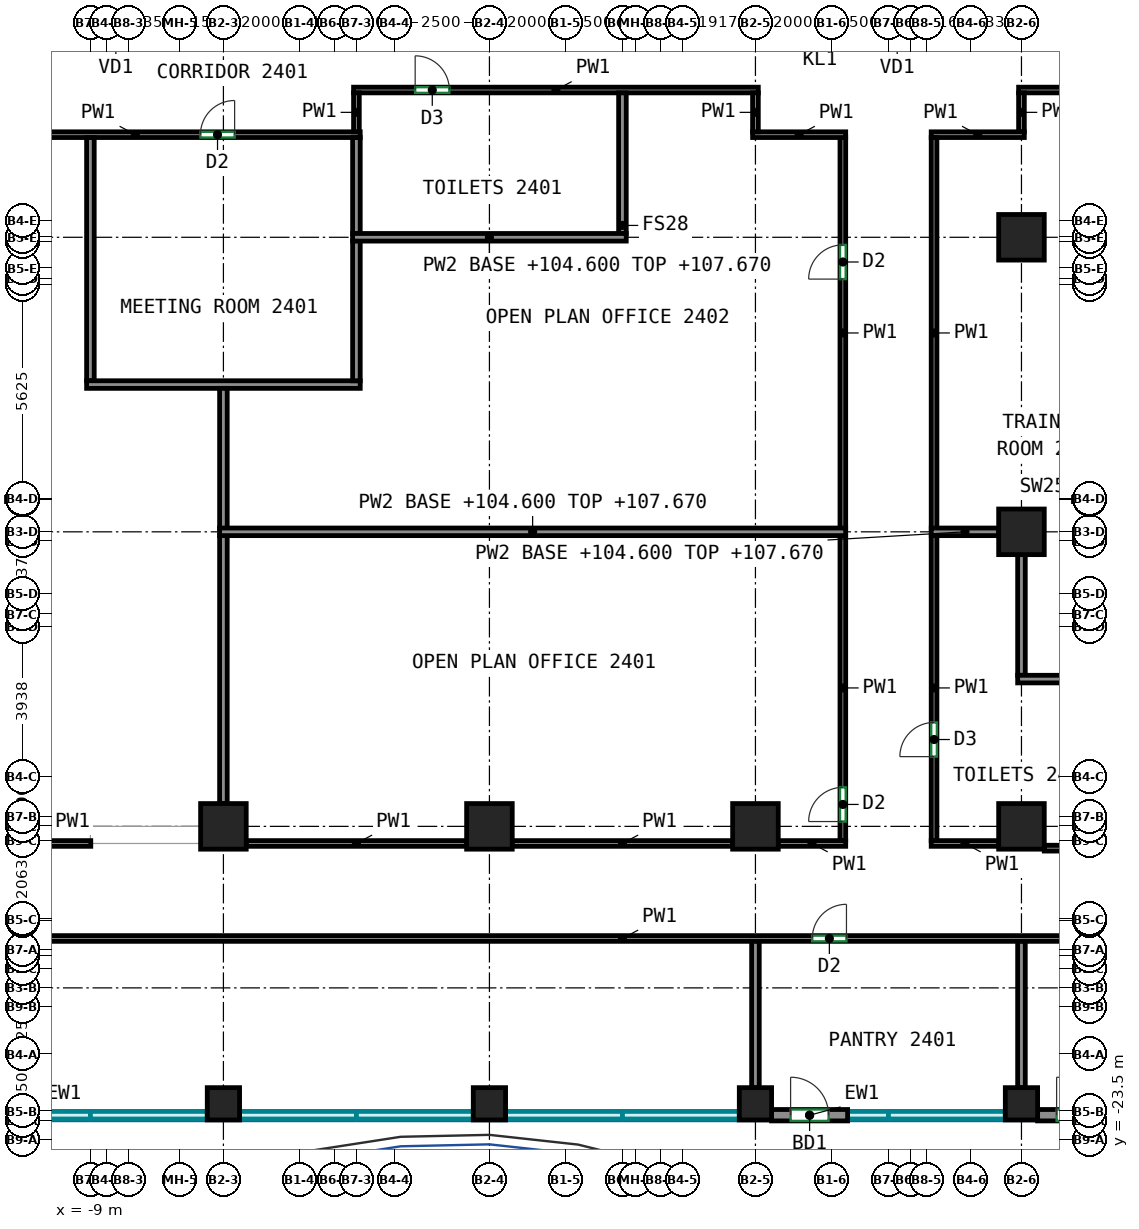
"""IFC4 building model, lengths in metres.
Left out: names, types, materials, properties, quantities, classifications, styles, units other than length and angle.
Written with IfcOpenShell. Run it as: python <this file> out.ifc"""

import sys

from ifc_helpers import new_model, si_unit, direction, frame, frame_2d, origin, origin_2d, place, context, subcontext, project, spatial, rectangle, extrude, source, transform, mapped, element, fill, save


model = new_model("IFC4")
c1 = context("Model", 3, precision=1e-05, world=origin(), true_north=direction((0.0, 1.0)))
c2 = subcontext(c1, "Body", "Model", "MODEL_VIEW")
j1 = project(units=[si_unit("LENGTHUNIT", "METRE"), si_unit("PLANEANGLEUNIT", "RADIAN")], contexts=[c1])
p1 = place(None, origin())
s1 = spatial("IfcSite", under=j1, at=p1, CompositionType="ELEMENT")
p2 = place(p1, origin())
s2 = spatial("IfcBuilding", under=s1, at=p2, CompositionType="ELEMENT")
p3 = place(p2, frame((0.0, 0.0, 104.6)))
s3 = spatial("IfcBuildingStorey", under=s2, at=p3, CompositionType="ELEMENT", Elevation=104.6)
m1 = source(origin(), c2, "Body", "SweptSolid", [
    extrude(rectangle(XDim=0.85, YDim=0.85, at=origin_2d()), origin(), (0.0, 0.0, 1.0), 3.72),
])
p4 = place(p3, frame((-5.5, -22.55, 0.0), z_axis=(0.0, 0.0, 1.0), x_axis=(1.0, 0.0, 0.0)))
e1 = element("IfcColumn", 1, at=p4, inside=s3, PredefinedType="COLUMN", context=c2, shape_type="MappedRepresentation", body=[
    mapped(m1, transform((0.0, 0.0, 0.0))),
])
m2 = source(origin(), c2, "Body", "SweptSolid", [
    extrude(rectangle(XDim=1.2, YDim=1.2, at=origin_2d()), origin(), (0.0, 0.0, 1.0), 3.72),
])
p5 = place(p3, frame((-5.5, -15.25, 0.0), z_axis=(0.0, 0.0, 1.0), x_axis=(1.0, 0.0, 0.0)))
e2 = element("IfcColumn", 2, at=p5, inside=s3, PredefinedType="COLUMN", context=c2, shape_type="MappedRepresentation", body=[
    mapped(m2, transform((0.0, 0.0, 0.0))),
])
p6 = place(p3, frame((1.5, -22.55, 0.0), z_axis=(0.0, 0.0, 1.0), x_axis=(1.0, 0.0, 0.0)))
e3 = element("IfcColumn", 3, at=p6, inside=s3, PredefinedType="COLUMN", context=c2, shape_type="MappedRepresentation", body=[
    mapped(m1, transform((0.0, 0.0, 0.0))),
])
p7 = place(p3, frame((1.5, -15.25, 0.0), z_axis=(0.0, 0.0, 1.0), x_axis=(1.0, 0.0, 0.0)))
e4 = element("IfcColumn", 4, at=p7, inside=s3, PredefinedType="COLUMN", context=c2, shape_type="MappedRepresentation", body=[
    mapped(m2, transform((0.0, 0.0, 0.0))),
])
p8 = place(p3, frame((8.5, -22.55, 0.0), z_axis=(0.0, 0.0, 1.0), x_axis=(1.0, 0.0, 0.0)))
e5 = element("IfcColumn", 5, at=p8, inside=s3, PredefinedType="COLUMN", context=c2, shape_type="MappedRepresentation", body=[
    mapped(m1, transform((0.0, 0.0, 0.0))),
])
p9 = place(p3, frame((8.5, -15.25, 0.0), z_axis=(0.0, 0.0, 1.0), x_axis=(1.0, 0.0, 0.0)))
e6 = element("IfcColumn", 6, at=p9, inside=s3, PredefinedType="COLUMN", context=c2, shape_type="MappedRepresentation", body=[
    mapped(m2, transform((0.0, 0.0, 0.0))),
])
p10 = place(p3, frame((15.5, -22.55, 0.0), z_axis=(0.0, 0.0, 1.0), x_axis=(1.0, 0.0, 0.0)))
e7 = element("IfcColumn", 7, at=p10, inside=s3, PredefinedType="COLUMN", context=c2, shape_type="MappedRepresentation", body=[
    mapped(m1, transform((0.0, 0.0, 0.0))),
])
for number, where, z_axis, x_axis in (
    (8, (15.5, -15.25, 0.0), (0.0, 0.0, 1.0), (1.0, 0.0, 0.0)),
    (9, (15.5, -7.5, 0.0), (0.0, 0.0, 1.0), (1.0, 0.0, 0.0)),
    (10, (15.5, 0.25, 0.0), (0.0, 0.0, 1.0), (1.0, 0.0, 0.0)),
):
    element("IfcColumn", number, at=place(p3, frame(where, z_axis=z_axis, x_axis=x_axis)), inside=s3, PredefinedType="COLUMN", context=c2, shape_type="MappedRepresentation", body=[
        mapped(m2, transform((0.0, 0.0, 0.0))),
    ])
m3 = source(origin(), c2, "Body", "SweptSolid", [
    extrude(rectangle(XDim=2.0, YDim=0.3, at=frame_2d((1.0, 0.0))), origin(), (0.0, 0.0, 1.0), 3.72),
])
p11 = place(p3, frame((8.925, -22.85, 0.0), z_axis=(0.0, 0.0, 1.0), x_axis=(1.0, 0.0, 0.0)))
e11 = element("IfcWall", 11, at=p11, inside=s3, PredefinedType="SOLIDWALL", context=c2, shape_type="MappedRepresentation", body=[
    mapped(m3, transform((0.0, 0.0, 0.0))),
])
p12 = place(p11, frame((0.5, 0.0, 0.0)))
e12 = element("IfcOpeningElement", 12, at=p12, cuts=e11, PredefinedType="OPENING", context=c2, shape_type="SweptSolid", body=[
    extrude(rectangle(XDim=1.0, YDim=2.1, at=frame_2d((0.5, 1.05))), frame((0.0, 0.16, 0.0), z_axis=(0.0, -1.0, 0.0), x_axis=(1.0, 0.0, 0.0)), (0.0, 0.0, 1.0), 0.32),
])
p13 = place(p3, frame((15.925, -22.85, 0.0), z_axis=(0.0, 0.0, 1.0), x_axis=(1.0, 0.0, 0.0)))
e13 = element("IfcWall", 13, at=p13, inside=s3, PredefinedType="SOLIDWALL", context=c2, shape_type="MappedRepresentation", body=[
    mapped(m3, transform((0.0, 0.0, 0.0))),
])
p14 = place(p13, frame((0.5, 0.0, 0.0)))
e14 = element("IfcOpeningElement", 14, at=p14, cuts=e13, PredefinedType="OPENING", context=c2, shape_type="SweptSolid", body=[
    extrude(rectangle(XDim=1.0, YDim=2.1, at=frame_2d((0.5, 1.05))), frame((0.0, 0.16, 0.0), z_axis=(0.0, -1.0, 0.0), x_axis=(1.0, 0.0, 0.0)), (0.0, 0.0, 1.0), 0.32),
])
p15 = place(p3, frame((-11.9, -15.7, 0.0), z_axis=(0.0, 0.0, 1.0), x_axis=(1.0, 0.0, 0.0)))
e15 = element("IfcWall", 15, at=p15, inside=s3, PredefinedType="PARTITIONING", context=c2, shape_type="SweptSolid", body=[
    extrude(rectangle(XDim=2.91, YDim=0.15, at=frame_2d((1.455, 0.0))), origin(), (0.0, 0.0, 1.0), 3.72),
])
p16 = place(p3, frame((-13.735, 2.95, 0.0), z_axis=(0.0, 0.0, 1.0), x_axis=(1.0, 0.0, 0.0)))
e16 = element("IfcWall", 16, at=p16, inside=s3, PredefinedType="PARTITIONING", context=c2, shape_type="SweptSolid", body=[
    extrude(rectangle(XDim=11.835, YDim=0.15, at=frame_2d((5.917, 0.0))), origin(), (0.0, 0.0, 1.0), 3.72),
])
p17 = place(p16, frame((7.63, 0.0, 0.0)))
e17 = element("IfcOpeningElement", 17, at=p17, cuts=e16, PredefinedType="OPENING", context=c2, shape_type="SweptSolid", body=[
    extrude(rectangle(XDim=0.9, YDim=2.1, at=frame_2d((0.45, 1.05))), frame((0.0, 0.085, 0.0), z_axis=(0.0, -1.0, 0.0), x_axis=(1.0, 0.0, 0.0)), (0.0, 0.0, 1.0), 0.17),
])
p18 = place(p3, frame((-19.325, -18.2, 0.0), z_axis=(0.0, 0.0, 1.0), x_axis=(1.0, 0.0, 0.0)))
e18 = element("IfcWall", 18, at=p18, inside=s3, PredefinedType="PARTITIONING", context=c2, shape_type="SweptSolid", body=[
    extrude(rectangle(XDim=48.65, YDim=0.15, at=frame_2d((24.325, 0.0))), origin(), (0.0, 0.0, 1.0), 3.72),
])
p19 = place(p18, frame((6.208, 0.0, 0.0)))
e19 = element("IfcOpeningElement", 19, at=p19, cuts=e18, PredefinedType="OPENING", context=c2, shape_type="SweptSolid", body=[
    extrude(rectangle(XDim=1.8, YDim=2.1, at=frame_2d((0.9, 1.05))), frame((0.0, 0.085, 0.0), z_axis=(0.0, -1.0, 0.0), x_axis=(1.0, 0.0, 0.0)), (0.0, 0.0, 1.0), 0.17),
])
p20 = place(p18, frame((29.32, 0.0, 0.0)))
e20 = element("IfcOpeningElement", 20, at=p20, cuts=e18, PredefinedType="OPENING", context=c2, shape_type="SweptSolid", body=[
    extrude(rectangle(XDim=0.9, YDim=2.1, at=frame_2d((0.45, 1.05))), frame((0.0, 0.085, 0.0), z_axis=(0.0, -1.0, 0.0), x_axis=(1.0, 0.0, 0.0)), (0.0, 0.0, 1.0), 0.17),
])
p21 = place(p18, frame((38.725, 0.0, 0.0)))
e21 = element("IfcOpeningElement", 21, at=p21, cuts=e18, PredefinedType="OPENING", context=c2, shape_type="SweptSolid", body=[
    extrude(rectangle(XDim=1.0, YDim=2.1, at=frame_2d((0.5, 1.05))), frame((0.0, 0.085, 0.0), z_axis=(0.0, -1.0, 0.0), x_axis=(1.0, 0.0, 0.0)), (0.0, 0.0, 1.0), 0.17),
])
p22 = place(p3, frame((-2.075, 4.125, 0.0), z_axis=(0.0, 0.0, 1.0), x_axis=(1.0, 0.0, 0.0)))
e22 = element("IfcWall", 22, at=p22, inside=s3, PredefinedType="PARTITIONING", context=c2, shape_type="SweptSolid", body=[
    extrude(rectangle(XDim=10.65, YDim=0.15, at=frame_2d((5.325, 0.0))), origin(), (0.0, 0.0, 1.0), 3.72),
])
p23 = place(p22, frame((1.621, 0.0, 0.0)))
e23 = element("IfcOpeningElement", 23, at=p23, cuts=e22, PredefinedType="OPENING", context=c2, shape_type="SweptSolid", body=[
    extrude(rectangle(XDim=0.9, YDim=2.1, at=frame_2d((0.45, 1.05))), frame((0.0, 0.085, 0.0), z_axis=(0.0, -1.0, 0.0), x_axis=(1.0, 0.0, 0.0)), (0.0, 0.0, 1.0), 0.17),
])
p24 = place(p3, frame((-2.0, 3.025, 0.0), z_axis=(0.0, 0.0, 1.0), x_axis=(0.0, 1.0, 0.0)))
e24 = element("IfcWall", 24, at=p24, inside=s3, PredefinedType="PARTITIONING", context=c2, shape_type="SweptSolid", body=[
    extrude(rectangle(XDim=1.025, YDim=0.15, at=frame_2d((0.513, 0.0))), origin(), (0.0, 0.0, 1.0), 3.72),
])
for number, where, z_axis, x_axis in (
    (25, (-4.9, -15.7, 0.0), (0.0, 0.0, 1.0), (1.0, 0.0, 0.0)),
    (26, (2.1, -15.7, 0.0), (0.0, 0.0, 1.0), (1.0, 0.0, 0.0)),
):
    element("IfcWall", number, at=place(p3, frame(where, z_axis=z_axis, x_axis=x_axis)), inside=s3, PredefinedType="PARTITIONING", context=c2, shape_type="SweptSolid", body=[
        extrude(rectangle(XDim=5.8, YDim=0.15, at=frame_2d((2.9, 0.0))), origin(), (0.0, 0.0, 1.0), 3.72),
    ])
p25 = place(p3, frame((9.1, -15.7, 0.0), z_axis=(0.0, 0.0, 1.0), x_axis=(1.0, 0.0, 0.0)))
e27 = element("IfcWall", 27, at=p25, inside=s3, PredefinedType="PARTITIONING", context=c2, shape_type="SweptSolid", body=[
    extrude(rectangle(XDim=1.775, YDim=0.15, at=frame_2d((0.887, 0.0))), origin(), (0.0, 0.0, 1.0), 3.72),
])
p26 = place(p3, frame((10.8, -15.625, 0.0), z_axis=(0.0, 0.0, 1.0), x_axis=(0.0, 1.0, 0.0)))
e28 = element("IfcWall", 28, at=p26, inside=s3, PredefinedType="PARTITIONING", context=c2, shape_type="SweptSolid", body=[
    extrude(rectangle(XDim=8.035, YDim=0.15, at=frame_2d((4.018, 0.0))), origin(), (0.0, 0.0, 1.0), 3.72),
])
p27 = place(p26, frame((0.502, 0.0, 0.0)))
e29 = element("IfcOpeningElement", 29, at=p27, cuts=e28, PredefinedType="OPENING", context=c2, shape_type="SweptSolid", body=[
    extrude(rectangle(XDim=0.9, YDim=2.1, at=frame_2d((0.45, 1.05))), frame((0.0, 0.085, 0.0), z_axis=(0.0, -1.0, 0.0), x_axis=(1.0, 0.0, 0.0)), (0.0, 0.0, 1.0), 0.17),
])
p28 = place(p3, frame((10.8, -7.41, 0.0), z_axis=(0.0, 0.0, 1.0), x_axis=(0.0, 1.0, 0.0)))
e30 = element("IfcWall", 30, at=p28, inside=s3, PredefinedType="PARTITIONING", context=c2, shape_type="SweptSolid", body=[
    extrude(rectangle(XDim=10.285, YDim=0.15, at=frame_2d((5.143, 0.0))), origin(), (0.0, 0.0, 1.0), 3.72),
])
p29 = place(p28, frame((6.56, 0.0, 0.0)))
e31 = element("IfcOpeningElement", 31, at=p29, cuts=e30, PredefinedType="OPENING", context=c2, shape_type="SweptSolid", body=[
    extrude(rectangle(XDim=0.9, YDim=2.1, at=frame_2d((0.45, 1.05))), frame((0.0, 0.085, 0.0), z_axis=(0.0, -1.0, 0.0), x_axis=(1.0, 0.0, 0.0)), (0.0, 0.0, 1.0), 0.17),
])
p30 = place(p3, frame((8.425, 2.95, 0.0), z_axis=(0.0, 0.0, 1.0), x_axis=(1.0, 0.0, 0.0)))
e32 = element("IfcWall", 32, at=p30, inside=s3, PredefinedType="PARTITIONING", context=c2, shape_type="SweptSolid", body=[
    extrude(rectangle(XDim=2.45, YDim=0.15, at=frame_2d((1.225, 0.0))), origin(), (0.0, 0.0, 1.0), 3.72),
])
p31 = place(p3, frame((8.5, 4.05, 0.0), z_axis=(0.0, 0.0, 1.0), x_axis=(0.0, -1.0, 0.0)))
e33 = element("IfcWall", 33, at=p31, inside=s3, PredefinedType="PARTITIONING", context=c2, shape_type="SweptSolid", body=[
    extrude(rectangle(XDim=1.025, YDim=0.15, at=frame_2d((0.513, 0.0))), origin(), (0.0, 0.0, 1.0), 3.72),
])
p32 = place(p3, frame((13.125, -15.7, 0.0), z_axis=(0.0, 0.0, 1.0), x_axis=(1.0, 0.0, 0.0)))
e34 = element("IfcWall", 34, at=p32, inside=s3, PredefinedType="PARTITIONING", context=c2, shape_type="SweptSolid", body=[
    extrude(rectangle(XDim=1.775, YDim=0.15, at=frame_2d((0.887, 0.0))), origin(), (0.0, 0.0, 1.0), 3.72),
])
p33 = place(p3, frame((16.1, -15.825, 0.0), z_axis=(0.0, 0.0, 1.0), x_axis=(1.0, 0.0, 0.0)))
e35 = element("IfcWall", 35, at=p33, inside=s3, PredefinedType="PARTITIONING", context=c2, shape_type="SweptSolid", body=[
    extrude(rectangle(XDim=13.225, YDim=0.15, at=frame_2d((6.612, 0.0))), origin(), (0.0, 0.0, 1.0), 3.72),
])
p34 = place(p3, frame((13.2, -15.625, 0.0), z_axis=(0.0, 0.0, 1.0), x_axis=(0.0, 1.0, 0.0)))
e36 = element("IfcWall", 36, at=p34, inside=s3, PredefinedType="PARTITIONING", context=c2, shape_type="SweptSolid", body=[
    extrude(rectangle(XDim=8.035, YDim=0.15, at=frame_2d((4.018, 0.0))), origin(), (0.0, 0.0, 1.0), 3.72),
])
p35 = place(p34, frame((2.21, 0.0, 0.0)))
e37 = element("IfcOpeningElement", 37, at=p35, cuts=e36, PredefinedType="OPENING", context=c2, shape_type="SweptSolid", body=[
    extrude(rectangle(XDim=0.9, YDim=2.1, at=frame_2d((0.45, 1.05))), frame((0.0, 0.085, 0.0), z_axis=(0.0, -1.0, 0.0), x_axis=(1.0, 0.0, 0.0)), (0.0, 0.0, 1.0), 0.17),
])
p36 = place(p3, frame((15.425, 4.125, 0.0), z_axis=(0.0, 0.0, 1.0), x_axis=(1.0, 0.0, 0.0)))
e38 = element("IfcWall", 38, at=p36, inside=s3, PredefinedType="PARTITIONING", context=c2, shape_type="SweptSolid", body=[
    extrude(rectangle(XDim=3.6, YDim=0.15, at=frame_2d((1.8, 0.0))), origin(), (0.0, 0.0, 1.0), 3.72),
])
p37 = place(p3, frame((15.5, 3.025, 0.0), z_axis=(0.0, 0.0, 1.0), x_axis=(0.0, 1.0, 0.0)))
e39 = element("IfcWall", 39, at=p37, inside=s3, PredefinedType="PARTITIONING", context=c2, shape_type="SweptSolid", body=[
    extrude(rectangle(XDim=1.025, YDim=0.15, at=frame_2d((0.513, 0.0))), origin(), (0.0, 0.0, 1.0), 3.72),
])
p38 = place(p3, frame((13.125, 2.95, 0.0), z_axis=(0.0, 0.0, 1.0), x_axis=(1.0, 0.0, 0.0)))
e40 = element("IfcWall", 40, at=p38, inside=s3, PredefinedType="PARTITIONING", context=c2, shape_type="SweptSolid", body=[
    extrude(rectangle(XDim=2.45, YDim=0.15, at=frame_2d((1.225, 0.0))), origin(), (0.0, 0.0, 1.0), 3.72),
])
p39 = place(p3, frame((13.2, -7.41, 0.0), z_axis=(0.0, 0.0, 1.0), x_axis=(0.0, 1.0, 0.0)))
e41 = element("IfcWall", 41, at=p39, inside=s3, PredefinedType="PARTITIONING", context=c2, shape_type="SweptSolid", body=[
    extrude(rectangle(XDim=10.285, YDim=0.15, at=frame_2d((5.143, 0.0))), origin(), (0.0, 0.0, 1.0), 3.72),
])
p40 = place(p3, frame((-9.0, -3.525, 0.0), z_axis=(0.0, 0.0, 1.0), x_axis=(0.0, 1.0, 0.0)))
e42 = element("IfcWall", 42, at=p40, inside=s3, PredefinedType="PARTITIONING", context=c2, shape_type="SweptSolid", body=[
    extrude(rectangle(XDim=6.399, YDim=0.2, at=frame_2d((3.199, 0.0))), origin(), (0.0, 0.0, 1.0), 3.72),
])
p41 = place(p3, frame((-9.1, -3.625, 0.0), z_axis=(0.0, 0.0, 1.0), x_axis=(1.0, 0.0, 0.0)))
e43 = element("IfcWall", 43, at=p41, inside=s3, PredefinedType="PARTITIONING", context=c2, shape_type="SweptSolid", body=[
    extrude(rectangle(XDim=7.2, YDim=0.2, at=frame_2d((3.6, 0.0))), origin(), (0.0, 0.0, 1.0), 3.72),
])
p42 = place(p3, frame((-5.5, -14.65, 0.0), z_axis=(0.0, 0.0, 1.0), x_axis=(0.0, 1.0, 0.0)))
e44 = element("IfcWall", 44, at=p42, inside=s3, PredefinedType="PARTITIONING", context=c2, shape_type="SweptSolid", body=[
    extrude(rectangle(XDim=7.06, YDim=0.2, at=frame_2d((3.53, 0.0))), origin(), (0.0, 0.0, 1.0), 3.72),
])
p43 = place(p3, frame((-5.5, -7.41, 0.0), z_axis=(0.0, 0.0, 1.0), x_axis=(0.0, 1.0, 0.0)))
e45 = element("IfcWall", 45, at=p43, inside=s3, PredefinedType="PARTITIONING", context=c2, shape_type="SweptSolid", body=[
    extrude(rectangle(XDim=3.685, YDim=0.2, at=frame_2d((1.842, 0.0))), origin(), (0.0, 0.0, 1.0), 3.72),
])
p44 = place(p3, frame((-2.0, 0.34, 0.0), z_axis=(0.0, 0.0, 1.0), x_axis=(0.0, 1.0, 0.0)))
e46 = element("IfcWall", 46, at=p44, inside=s3, PredefinedType="PARTITIONING", context=c2, shape_type="SweptSolid", body=[
    extrude(rectangle(XDim=2.534, YDim=0.2, at=frame_2d((1.267, 0.0))), origin(), (0.0, 0.0, 1.0), 3.72),
])
p45 = place(p3, frame((-2.0, -3.525, 0.0), z_axis=(0.0, 0.0, 1.0), x_axis=(0.0, 1.0, 0.0)))
e47 = element("IfcWall", 47, at=p45, inside=s3, PredefinedType="PARTITIONING", context=c2, shape_type="SweptSolid", body=[
    extrude(rectangle(XDim=3.685, YDim=0.2, at=frame_2d((1.842, 0.0))), origin(), (0.0, 0.0, 1.0), 3.72),
])
p46 = place(p3, frame((8.5, -22.125, 0.0), z_axis=(0.0, 0.0, 1.0), x_axis=(0.0, 1.0, 0.0)))
e48 = element("IfcWall", 48, at=p46, inside=s3, PredefinedType="PARTITIONING", context=c2, shape_type="SweptSolid", body=[
    extrude(rectangle(XDim=3.849, YDim=0.2, at=frame_2d((1.925, 0.0))), origin(), (0.0, 0.0, 1.0), 3.72),
])
p47 = place(p3, frame((5.0, 0.35, 0.0), z_axis=(0.0, 0.0, 1.0), x_axis=(0.0, 1.0, 0.0)))
e49 = element("IfcWall", 49, at=p47, inside=s3, PredefinedType="PARTITIONING", context=c2, shape_type="SweptSolid", body=[
    extrude(rectangle(XDim=3.699, YDim=0.2, at=frame_2d((1.85, 0.0))), origin(), (0.0, 0.0, 1.0), 3.72),
])
p48 = place(p3, frame((-2.1, 0.25, 0.0), z_axis=(0.0, 0.0, 1.0), x_axis=(1.0, 0.0, 0.0)))
e50 = element("IfcWall", 50, at=p48, inside=s3, PredefinedType="PARTITIONING", context=c2, shape_type="SweptSolid", body=[
    extrude(rectangle(XDim=7.2, YDim=0.2, at=frame_2d((3.6, 0.0))), origin(), (0.0, 0.0, 1.0), 3.07),
])
p49 = place(p3, frame((15.5, -22.125, 0.0), z_axis=(0.0, 0.0, 1.0), x_axis=(0.0, 1.0, 0.0)))
e51 = element("IfcWall", 51, at=p49, inside=s3, PredefinedType="PARTITIONING", context=c2, shape_type="SweptSolid", body=[
    extrude(rectangle(XDim=3.849, YDim=0.2, at=frame_2d((1.925, 0.0))), origin(), (0.0, 0.0, 1.0), 3.72),
])
p50 = place(p3, frame((-5.6, -7.5, 0.0), z_axis=(0.0, 0.0, 1.0), x_axis=(1.0, 0.0, 0.0)))
e52 = element("IfcWall", 52, at=p50, inside=s3, PredefinedType="PARTITIONING", context=c2, shape_type="SweptSolid", body=[
    extrude(rectangle(XDim=16.474, YDim=0.2, at=frame_2d((8.237, 0.0))), origin(), (0.0, 0.0, 1.0), 3.07),
])
p51 = place(p3, frame((13.126, -7.5, 0.0), z_axis=(0.0, 0.0, 1.0), x_axis=(1.0, 0.0, 0.0)))
e53 = element("IfcWall", 53, at=p51, inside=s3, PredefinedType="PARTITIONING", context=c2, shape_type="SweptSolid", body=[
    extrude(rectangle(XDim=1.774, YDim=0.2, at=frame_2d((0.887, 0.0))), origin(), (0.0, 0.0, 1.0), 3.07),
])
p52 = place(p3, frame((15.5, -11.275, 0.0), z_axis=(0.0, 0.0, 1.0), x_axis=(0.0, 1.0, 0.0)))
e54 = element("IfcWall", 54, at=p52, inside=s3, PredefinedType="PARTITIONING", context=c2, shape_type="SweptSolid", body=[
    extrude(rectangle(XDim=3.175, YDim=0.2, at=frame_2d((1.587, 0.0))), origin(), (0.0, 0.0, 1.0), 3.72),
])
p53 = place(p3, frame((17.75, -11.375, 0.0), z_axis=(0.0, 0.0, 1.0), x_axis=(-1.0, 0.0, 0.0)))
e55 = element("IfcWall", 55, at=p53, inside=s3, PredefinedType="PARTITIONING", context=c2, shape_type="SweptSolid", body=[
    extrude(rectangle(XDim=2.35, YDim=0.2, at=frame_2d((1.175, 0.0))), origin(), (0.0, 0.0, 1.0), 3.72),
])
p54 = place(p12, origin())
e56 = element("IfcDoor", 56, at=p54, inside=s3, OperationType="SINGLE_SWING_LEFT", PredefinedType="DOOR", context=c2, shape_type="SweptSolid", body=[
    extrude(rectangle(XDim=1.0, YDim=2.1, at=frame_2d((0.5, 1.05))), frame((0.0, 0.025, 0.0), z_axis=(0.0, -1.0, 0.0), x_axis=(1.0, 0.0, 0.0)), (0.0, 0.0, 1.0), 0.05),
])
fill(e12, e56)
p55 = place(p14, origin())
e57 = element("IfcDoor", 57, at=p55, inside=s3, OperationType="SINGLE_SWING_LEFT", PredefinedType="DOOR", context=c2, shape_type="SweptSolid", body=[
    extrude(rectangle(XDim=1.0, YDim=2.1, at=frame_2d((0.5, 1.05))), frame((0.0, 0.025, 0.0), z_axis=(0.0, -1.0, 0.0), x_axis=(1.0, 0.0, 0.0)), (0.0, 0.0, 1.0), 0.05),
])
fill(e14, e57)
p56 = place(p20, origin())
e58 = element("IfcDoor", 58, at=p56, inside=s3, OperationType="SINGLE_SWING_RIGHT", PredefinedType="DOOR", context=c2, shape_type="SweptSolid", body=[
    extrude(rectangle(XDim=0.9, YDim=2.1, at=frame_2d((0.45, 1.05))), frame((0.0, 0.025, 0.0), z_axis=(0.0, -1.0, 0.0), x_axis=(1.0, 0.0, 0.0)), (0.0, 0.0, 1.0), 0.05),
])
fill(e20, e58)
p57 = place(p27, origin())
e59 = element("IfcDoor", 59, at=p57, inside=s3, OperationType="SINGLE_SWING_LEFT", PredefinedType="DOOR", context=c2, shape_type="SweptSolid", body=[
    extrude(rectangle(XDim=0.9, YDim=2.1, at=frame_2d((0.45, 1.05))), frame((0.0, 0.025, 0.0), z_axis=(0.0, -1.0, 0.0), x_axis=(1.0, 0.0, 0.0)), (0.0, 0.0, 1.0), 0.05),
])
fill(e29, e59)
p58 = place(p35, origin())
e60 = element("IfcDoor", 60, at=p58, inside=s3, OperationType="SINGLE_SWING_LEFT", PredefinedType="DOOR", context=c2, shape_type="SweptSolid", body=[
    extrude(rectangle(XDim=0.9, YDim=2.1, at=frame_2d((0.45, 1.05))), frame((0.0, 0.025, 0.0), z_axis=(0.0, -1.0, 0.0), x_axis=(1.0, 0.0, 0.0)), (0.0, 0.0, 1.0), 0.05),
])
fill(e37, e60)
p59 = place(p29, origin())
e61 = element("IfcDoor", 61, at=p59, inside=s3, OperationType="SINGLE_SWING_LEFT", PredefinedType="DOOR", context=c2, shape_type="SweptSolid", body=[
    extrude(rectangle(XDim=0.9, YDim=2.1, at=frame_2d((0.45, 1.05))), frame((0.0, 0.025, 0.0), z_axis=(0.0, -1.0, 0.0), x_axis=(1.0, 0.0, 0.0)), (0.0, 0.0, 1.0), 0.05),
])
fill(e31, e61)
p60 = place(p17, origin())
e62 = element("IfcDoor", 62, at=p60, inside=s3, OperationType="SINGLE_SWING_RIGHT", PredefinedType="DOOR", context=c2, shape_type="SweptSolid", body=[
    extrude(rectangle(XDim=0.9, YDim=2.1, at=frame_2d((0.45, 1.05))), frame((0.0, 0.025, 0.0), z_axis=(0.0, -1.0, 0.0), x_axis=(1.0, 0.0, 0.0)), (0.0, 0.0, 1.0), 0.05),
])
fill(e17, e62)
p61 = place(p23, origin())
e63 = element("IfcDoor", 63, at=p61, inside=s3, OperationType="SINGLE_SWING_LEFT", PredefinedType="DOOR", context=c2, shape_type="SweptSolid", body=[
    extrude(rectangle(XDim=0.9, YDim=2.1, at=frame_2d((0.45, 1.05))), frame((0.0, 0.025, 0.0), z_axis=(0.0, -1.0, 0.0), x_axis=(1.0, 0.0, 0.0)), (0.0, 0.0, 1.0), 0.05),
])
fill(e23, e63)
save(model, sys.argv[1])
